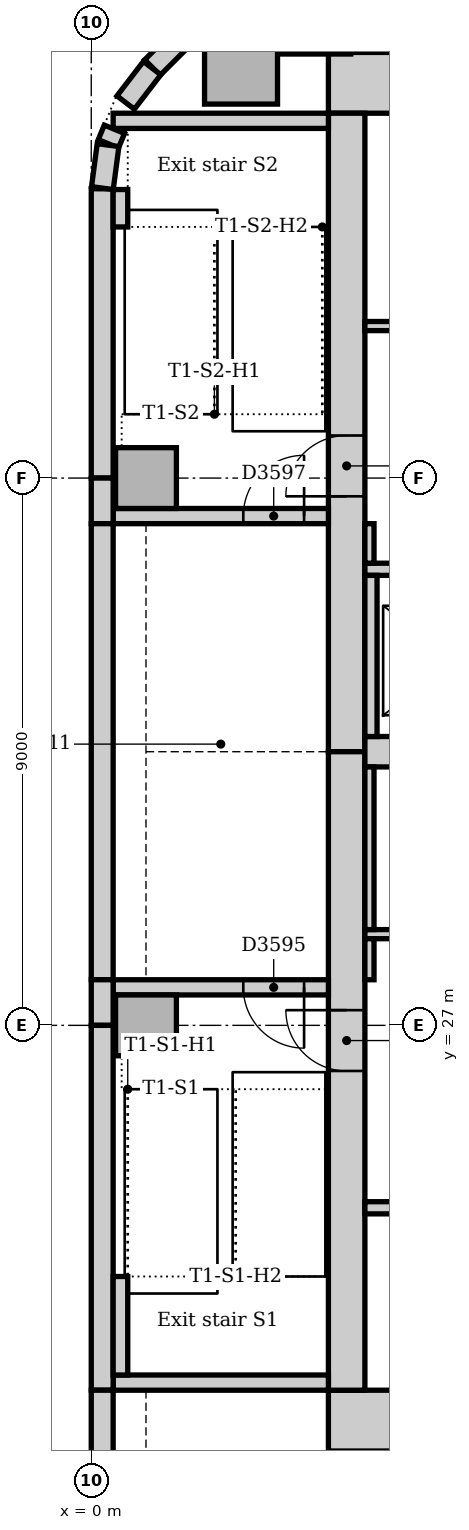
"""IFC4 building model, lengths in metres.
Left out: names, types, materials, properties, quantities, classifications, styles, units other than length and angle.
Written with IfcOpenShell. Run it as: python <this file> out.ifc"""

import sys

from ifc_helpers import new_model, si_unit, direction, frame, frame_2d, origin, origin_2d, place, context, subcontext, project, spatial, rectangle, extrude, element, fill, save


model = new_model("IFC4")
c1 = context("Model", 3, precision=1e-05, world=origin(), true_north=direction((0.0, 1.0)))
c2 = subcontext(c1, "Body", "Model", "MODEL_VIEW")
j1 = project(units=[si_unit("LENGTHUNIT", "METRE"), si_unit("PLANEANGLEUNIT", "RADIAN")], contexts=[c1])
p1 = place(None, origin())
s1 = spatial("IfcSite", under=j1, at=p1, CompositionType="ELEMENT")
p2 = place(p1, origin())
s2 = spatial("IfcBuilding", under=s1, at=p2, CompositionType="ELEMENT")
p3 = place(p2, frame((0.0, 0.0, 67.0)))
s3 = spatial("IfcBuildingStorey", under=s2, at=p3, CompositionType="ELEMENT", Elevation=67.0)
for number, where, z_axis, x_axis in (
    (1, (3.9, 20.5, 0.0), (0.0, 0.0, 1.0), (1.0, 0.0, 0.0)),
    (2, (23.5, 42.5, 0.0), (0.0, 0.0, 1.0), (-1.0, 0.0, 0.0)),
):
    element("IfcWall", number, at=place(p3, frame(where, z_axis=z_axis, x_axis=x_axis)), inside=s3, PredefinedType="SOLIDWALL", context=c2, shape_type="SweptSolid", body=[
        extrude(rectangle(XDim=19.6, YDim=1.0, at=frame_2d((9.8, 0.0))), origin(), (0.0, 0.0, 1.0), 4.0),
    ])
p4 = place(p3, frame((4.2, 42.0, 0.0), z_axis=(0.0, 0.0, 1.0), x_axis=(0.0, -1.0, 0.0)))
e3 = element("IfcWall", 3, at=p4, inside=s3, PredefinedType="SOLIDWALL", context=c2, shape_type="SweptSolid", body=[
    extrude(rectangle(XDim=10.5, YDim=0.6, at=frame_2d((5.25, 0.0))), origin(), (0.0, 0.0, 1.0), 4.0),
])
p5 = place(p4, frame((5.3, 0.0, 0.0)))
e4 = element("IfcOpeningElement", 4, at=p5, cuts=e3, PredefinedType="OPENING", context=c2, shape_type="SweptSolid", body=[
    extrude(rectangle(XDim=1.0, YDim=2.1, at=frame_2d((0.5, 1.05))), frame((0.0, 0.31, 0.0), z_axis=(0.0, -1.0, 0.0), x_axis=(1.0, 0.0, 0.0)), (0.0, 0.0, 1.0), 0.62),
])
p6 = place(p3, frame((4.2, 31.5, 0.0), z_axis=(0.0, 0.0, 1.0), x_axis=(0.0, -1.0, 0.0)))
e5 = element("IfcWall", 5, at=p6, inside=s3, PredefinedType="SOLIDWALL", context=c2, shape_type="SweptSolid", body=[
    extrude(rectangle(XDim=10.5, YDim=0.6, at=frame_2d((5.25, 0.0))), origin(), (0.0, 0.0, 1.0), 4.0),
])
p7 = place(p6, frame((4.25, 0.0, 0.0)))
e6 = element("IfcOpeningElement", 6, at=p7, cuts=e5, PredefinedType="OPENING", context=c2, shape_type="SweptSolid", body=[
    extrude(rectangle(XDim=1.0, YDim=2.1, at=frame_2d((0.5, 1.05))), frame((0.0, 0.31, 0.0), z_axis=(0.0, -1.0, 0.0), x_axis=(1.0, 0.0, 0.0)), (0.0, 0.0, 1.0), 0.62),
])
p8 = place(p3, frame((4.5, 31.5, 0.0), z_axis=(0.0, 0.0, 1.0), x_axis=(1.0, 0.0, 0.0)))
e7 = element("IfcWall", 7, at=p8, inside=s3, PredefinedType="SOLIDWALL", context=c2, shape_type="SweptSolid", body=[
    extrude(rectangle(XDim=18.0, YDim=0.5, at=frame_2d((9.0, 0.0))), origin(), (0.0, 0.0, 1.0), 4.0),
])
p9 = place(p3, frame((0.36, 21.125, 0.0), z_axis=(0.0, 0.0, 1.0), x_axis=(1.0, 0.0, 0.0)))
e8 = element("IfcWall", 8, at=p9, inside=s3, PredefinedType="SOLIDWALL", context=c2, shape_type="SweptSolid", body=[
    extrude(rectangle(XDim=3.54, YDim=0.25, at=frame_2d((1.77, 0.0))), origin(), (0.0, 0.0, 1.0), 4.0),
])
p10 = place(p3, frame((3.9, 27.625, 0.0), z_axis=(0.0, 0.0, 1.0), x_axis=(-1.0, 0.0, 0.0)))
e9 = element("IfcWall", 9, at=p10, inside=s3, PredefinedType="SOLIDWALL", context=c2, shape_type="SweptSolid", body=[
    extrude(rectangle(XDim=3.54, YDim=0.25, at=frame_2d((1.77, 0.0))), origin(), (0.0, 0.0, 1.0), 4.0),
])
p11 = place(p10, frame((0.4, 0.0, 0.0)))
e10 = element("IfcOpeningElement", 10, at=p11, cuts=e9, PredefinedType="OPENING", context=c2, shape_type="SweptSolid", body=[
    extrude(rectangle(XDim=1.0, YDim=2.1, at=frame_2d((0.5, 1.05))), frame((0.0, 0.135, 0.0), z_axis=(0.0, -1.0, 0.0), x_axis=(1.0, 0.0, 0.0)), (0.0, 0.0, 1.0), 0.27),
])
p12 = place(p3, frame((0.36, 35.375, 0.0), z_axis=(0.0, 0.0, 1.0), x_axis=(1.0, 0.0, 0.0)))
e11 = element("IfcWall", 11, at=p12, inside=s3, PredefinedType="SOLIDWALL", context=c2, shape_type="SweptSolid", body=[
    extrude(rectangle(XDim=3.54, YDim=0.25, at=frame_2d((1.77, 0.0))), origin(), (0.0, 0.0, 1.0), 4.0),
])
p13 = place(p12, frame((2.14, 0.0, 0.0)))
e12 = element("IfcOpeningElement", 12, at=p13, cuts=e11, PredefinedType="OPENING", context=c2, shape_type="SweptSolid", body=[
    extrude(rectangle(XDim=1.0, YDim=2.1, at=frame_2d((0.5, 1.05))), frame((0.0, 0.135, 0.0), z_axis=(0.0, -1.0, 0.0), x_axis=(1.0, 0.0, 0.0)), (0.0, 0.0, 1.0), 0.27),
])
p14 = place(p3, frame((3.9, 41.875, 0.0), z_axis=(0.0, 0.0, 1.0), x_axis=(-1.0, 0.0, 0.0)))
e13 = element("IfcWall", 13, at=p14, inside=s3, PredefinedType="SOLIDWALL", context=c2, shape_type="SweptSolid", body=[
    extrude(rectangle(XDim=3.54, YDim=0.25, at=frame_2d((1.77, 0.0))), origin(), (0.0, 0.0, 1.0), 4.0),
])
for number, where, z_axis, x_axis in (
    (14, (3.667, 43.574, 0.0), (0.0, 0.0, 1.0), (1.0, 0.0, 0.0)),
    (15, (2.463, 42.75, 0.0), (0.0, 0.0, 1.0), (1.0, 0.0, 0.0)),
):
    element("IfcColumn", number, at=place(p3, frame(where, z_axis=z_axis, x_axis=x_axis)), inside=s3, PredefinedType="COLUMN", context=c2, shape_type="SweptSolid", body=[
        extrude(rectangle(XDim=1.2, YDim=1.2, at=origin_2d()), origin(), (0.0, 0.0, 1.0), 3.85),
    ])
for number, where, z_axis, x_axis in (
    (16, (0.9, 27.0, 0.0), (0.0, 0.0, 1.0), (1.0, 0.0, 0.0)),
    (17, (0.9, 36.0, 0.0), (0.0, 0.0, 1.0), (1.0, 0.0, 0.0)),
):
    element("IfcColumn", number, at=place(p3, frame(where, z_axis=z_axis, x_axis=x_axis)), inside=s3, PredefinedType="COLUMN", context=c2, shape_type="SweptSolid", body=[
        extrude(rectangle(XDim=1.0, YDim=1.0, at=origin_2d()), origin(), (0.0, 0.0, 1.0), 4.0),
    ])
p15 = place(p3, frame((2.249, 43.994, 0.0), z_axis=(0.0, 0.0, 1.0), x_axis=(-0.707106781187, -0.707106781187, 0.0)))
e18 = element("IfcWall", 18, at=p15, inside=s3, PredefinedType="STANDARD", context=c2, shape_type="SweptSolid", body=[
    extrude(rectangle(XDim=1.757, YDim=0.36, at=frame_2d((0.879, 0.0))), origin(), (0.0, 0.0, 1.0), 3.85),
])
p16 = place(p3, frame((0.18, 40.757, 0.0), z_axis=(0.0, 0.0, 1.0), x_axis=(0.0, -1.0, 0.0)))
e19 = element("IfcWall", 19, at=p16, inside=s3, PredefinedType="STANDARD", context=c2, shape_type="SweptSolid", body=[
    extrude(rectangle(XDim=4.757, YDim=0.36, at=frame_2d((2.379, 0.0))), origin(), (0.0, 0.0, 1.0), 3.85),
])
p17 = place(p3, frame((0.18, 36.0, 0.0), z_axis=(0.0, 0.0, 1.0), x_axis=(0.0, -1.0, 0.0)))
e20 = element("IfcWall", 20, at=p17, inside=s3, PredefinedType="STANDARD", context=c2, shape_type="SweptSolid", body=[
    extrude(rectangle(XDim=0.75, YDim=0.36, at=frame_2d((0.375, 0.0))), origin(), (0.0, 0.0, 1.0), 3.436),
])
p18 = place(p3, frame((0.18, 35.25, 0.0), z_axis=(0.0, 0.0, 1.0), x_axis=(0.0, -1.0, 0.0)))
e21 = element("IfcWall", 21, at=p18, inside=s3, PredefinedType="STANDARD", context=c2, shape_type="SweptSolid", body=[
    extrude(rectangle(XDim=7.5, YDim=0.36, at=frame_2d((3.75, 0.0))), origin(), (0.0, 0.0, 1.0), 3.436),
])
p19 = place(p3, frame((0.18, 27.75, 0.0), z_axis=(0.0, 0.0, 1.0), x_axis=(0.0, -1.0, 0.0)))
e22 = element("IfcWall", 22, at=p19, inside=s3, PredefinedType="STANDARD", context=c2, shape_type="SweptSolid", body=[
    extrude(rectangle(XDim=0.75, YDim=0.36, at=frame_2d((0.375, 0.0))), origin(), (0.0, 0.0, 1.0), 3.436),
])
p20 = place(p3, frame((0.18, 27.0, 0.0), z_axis=(0.0, 0.0, 1.0), x_axis=(0.0, -1.0, 0.0)))
e23 = element("IfcWall", 23, at=p20, inside=s3, PredefinedType="STANDARD", context=c2, shape_type="SweptSolid", body=[
    extrude(rectangle(XDim=6.0, YDim=0.36, at=frame_2d((3.0, 0.0))), origin(), (0.0, 0.0, 1.0), 3.85),
])
p21 = place(p3, frame((0.18, 21.0, 0.0), z_axis=(0.0, 0.0, 1.0), x_axis=(0.0, -1.0, 0.0)))
e24 = element("IfcWall", 24, at=p21, inside=s3, PredefinedType="STANDARD", context=c2, shape_type="SweptSolid", body=[
    extrude(rectangle(XDim=16.757, YDim=0.36, at=frame_2d((8.379, 0.0))), origin(), (0.0, 0.0, 1.0), 3.85),
])
p22 = place(p21, frame((1.35, 0.0, 0.9)))
e25 = element("IfcOpeningElement", 25, at=p22, cuts=e24, PredefinedType="OPENING", context=c2, shape_type="SweptSolid", body=[
    extrude(rectangle(XDim=3.3, YDim=1.6, at=frame_2d((1.65, 0.8))), frame((0.0, 0.19, 0.0), z_axis=(0.0, -1.0, 0.0), x_axis=(1.0, 0.0, 0.0)), (0.0, 0.0, 1.0), 0.38),
])
p23 = place(p21, frame((5.85, 0.0, 0.9)))
e26 = element("IfcOpeningElement", 26, at=p23, cuts=e24, PredefinedType="OPENING", context=c2, shape_type="SweptSolid", body=[
    extrude(rectangle(XDim=3.3, YDim=1.6, at=frame_2d((1.65, 0.8))), frame((0.0, 0.19, 0.0), z_axis=(0.0, -1.0, 0.0), x_axis=(1.0, 0.0, 0.0)), (0.0, 0.0, 1.0), 0.38),
])
p24 = place(p21, frame((10.35, 0.0, 0.9)))
e27 = element("IfcOpeningElement", 27, at=p24, cuts=e24, PredefinedType="OPENING", context=c2, shape_type="SweptSolid", body=[
    extrude(rectangle(XDim=3.3, YDim=1.6, at=frame_2d((1.65, 0.8))), frame((0.0, 0.19, 0.0), z_axis=(0.0, -1.0, 0.0), x_axis=(1.0, 0.0, 0.0)), (0.0, 0.0, 1.0), 0.38),
])
p25 = place(p3, frame((1.0, 42.741, 0.0), z_axis=(0.0, 0.0, 1.0), x_axis=(-0.608802368033, -0.793321924995, 0.0)))
e28 = element("IfcWall", 28, at=p25, inside=s3, PredefinedType="STANDARD", context=c2, shape_type="SweptSolid", body=[
    extrude(rectangle(XDim=0.713, YDim=0.36, at=frame_2d((0.357, 0.0))), origin(), (0.0, 0.0, 1.0), 3.85),
])
p26 = place(p3, frame((0.381, 41.736, 0.0), z_axis=(0.0, 0.0, 1.0), x_axis=(-0.382773360986, -0.923842277729, 0.0)))
e29 = element("IfcWall", 29, at=p26, inside=s3, PredefinedType="STANDARD", context=c2, shape_type="SweptSolid", body=[
    extrude(rectangle(XDim=0.258, YDim=0.36, at=frame_2d((0.129, 0.0))), origin(), (0.0, 0.0, 1.0), 3.85),
])
p27 = place(p3, frame((0.276, 41.476, 0.0), z_axis=(0.0, 0.0, 1.0), x_axis=(-0.13055608231, -0.99144092581, 0.0)))
e30 = element("IfcWall", 30, at=p27, inside=s3, PredefinedType="STANDARD", context=c2, shape_type="SweptSolid", body=[
    extrude(rectangle(XDim=0.713, YDim=0.36, at=frame_2d((0.356, 0.0))), origin(), (0.0, 0.0, 1.0), 3.85),
])
p28 = place(p3, frame((0.48, 21.25, 0.0), z_axis=(0.0, 0.0, 1.0), x_axis=(0.0, 1.0, 0.0)))
e31 = element("IfcWall", 31, at=p28, inside=s3, PredefinedType="STANDARD", context=c2, shape_type="SweptSolid", body=[
    extrude(rectangle(XDim=1.62, YDim=0.24, at=frame_2d((0.81, 0.0))), origin(), (0.0, 0.0, 1.0), 4.0),
])
p29 = place(p3, frame((0.48, 40.13, 0.0), z_axis=(0.0, 0.0, 1.0), x_axis=(0.0, 1.0, 0.0)))
e32 = element("IfcWall", 32, at=p29, inside=s3, PredefinedType="STANDARD", context=c2, shape_type="SweptSolid", body=[
    extrude(rectangle(XDim=0.615, YDim=0.24, at=frame_2d((0.307, 0.0))), origin(), (0.0, 0.0, 1.0), 4.0),
])
p30 = place(p3, frame((4.5, 24.0, 0.0), z_axis=(0.0, 0.0, 1.0), x_axis=(1.0, 0.0, 0.0)))
e33 = element("IfcWall", 33, at=p30, inside=s3, PredefinedType="PARTITIONING", context=c2, shape_type="SweptSolid", body=[
    extrude(rectangle(XDim=18.0, YDim=0.2, at=frame_2d((9.0, 0.0))), origin(), (0.0, 0.0, 1.0), 3.85),
])
p31 = place(p30, frame((0.95, 0.0, 0.0)))
e34 = element("IfcOpeningElement", 34, at=p31, cuts=e33, PredefinedType="OPENING", context=c2, shape_type="SweptSolid", body=[
    extrude(rectangle(XDim=1.1, YDim=2.1, at=frame_2d((0.55, 1.05))), frame((0.0, 0.11, 0.0), z_axis=(0.0, -1.0, 0.0), x_axis=(1.0, 0.0, 0.0)), (0.0, 0.0, 1.0), 0.22),
])
p32 = place(p30, frame((3.95, 0.0, 0.0)))
e35 = element("IfcOpeningElement", 35, at=p32, cuts=e33, PredefinedType="OPENING", context=c2, shape_type="SweptSolid", body=[
    extrude(rectangle(XDim=1.1, YDim=2.1, at=frame_2d((0.55, 1.05))), frame((0.0, 0.11, 0.0), z_axis=(0.0, -1.0, 0.0), x_axis=(1.0, 0.0, 0.0)), (0.0, 0.0, 1.0), 0.22),
])
p33 = place(p30, frame((6.95, 0.0, 0.0)))
e36 = element("IfcOpeningElement", 36, at=p33, cuts=e33, PredefinedType="OPENING", context=c2, shape_type="SweptSolid", body=[
    extrude(rectangle(XDim=1.1, YDim=2.1, at=frame_2d((0.55, 1.05))), frame((0.0, 0.11, 0.0), z_axis=(0.0, -1.0, 0.0), x_axis=(1.0, 0.0, 0.0)), (0.0, 0.0, 1.0), 0.22),
])
p34 = place(p30, frame((9.95, 0.0, 0.0)))
e37 = element("IfcOpeningElement", 37, at=p34, cuts=e33, PredefinedType="OPENING", context=c2, shape_type="SweptSolid", body=[
    extrude(rectangle(XDim=1.1, YDim=2.1, at=frame_2d((0.55, 1.05))), frame((0.0, 0.11, 0.0), z_axis=(0.0, -1.0, 0.0), x_axis=(1.0, 0.0, 0.0)), (0.0, 0.0, 1.0), 0.22),
])
p35 = place(p30, frame((12.95, 0.0, 0.0)))
e38 = element("IfcOpeningElement", 38, at=p35, cuts=e33, PredefinedType="OPENING", context=c2, shape_type="SweptSolid", body=[
    extrude(rectangle(XDim=1.1, YDim=2.1, at=frame_2d((0.55, 1.05))), frame((0.0, 0.11, 0.0), z_axis=(0.0, -1.0, 0.0), x_axis=(1.0, 0.0, 0.0)), (0.0, 0.0, 1.0), 0.22),
])
p36 = place(p30, frame((15.95, 0.0, 0.0)))
e39 = element("IfcOpeningElement", 39, at=p36, cuts=e33, PredefinedType="OPENING", context=c2, shape_type="SweptSolid", body=[
    extrude(rectangle(XDim=1.1, YDim=2.1, at=frame_2d((0.55, 1.05))), frame((0.0, 0.11, 0.0), z_axis=(0.0, -1.0, 0.0), x_axis=(1.0, 0.0, 0.0)), (0.0, 0.0, 1.0), 0.22),
])
p37 = place(p3, frame((4.5, 34.5, 0.0), z_axis=(0.0, 0.0, 1.0), x_axis=(1.0, 0.0, 0.0)))
e40 = element("IfcWall", 40, at=p37, inside=s3, PredefinedType="PARTITIONING", context=c2, shape_type="SweptSolid", body=[
    extrude(rectangle(XDim=18.0, YDim=0.2, at=frame_2d((9.0, 0.0))), origin(), (0.0, 0.0, 1.0), 3.85),
])
p38 = place(p37, frame((0.95, 0.0, 0.0)))
e41 = element("IfcOpeningElement", 41, at=p38, cuts=e40, PredefinedType="OPENING", context=c2, shape_type="SweptSolid", body=[
    extrude(rectangle(XDim=1.1, YDim=2.1, at=frame_2d((0.55, 1.05))), frame((0.0, 0.11, 0.0), z_axis=(0.0, -1.0, 0.0), x_axis=(1.0, 0.0, 0.0)), (0.0, 0.0, 1.0), 0.22),
])
p39 = place(p37, frame((3.95, 0.0, 0.0)))
e42 = element("IfcOpeningElement", 42, at=p39, cuts=e40, PredefinedType="OPENING", context=c2, shape_type="SweptSolid", body=[
    extrude(rectangle(XDim=1.1, YDim=2.1, at=frame_2d((0.55, 1.05))), frame((0.0, 0.11, 0.0), z_axis=(0.0, -1.0, 0.0), x_axis=(1.0, 0.0, 0.0)), (0.0, 0.0, 1.0), 0.22),
])
p40 = place(p37, frame((12.95, 0.0, 0.0)))
e43 = element("IfcOpeningElement", 43, at=p40, cuts=e40, PredefinedType="OPENING", context=c2, shape_type="SweptSolid", body=[
    extrude(rectangle(XDim=1.1, YDim=2.1, at=frame_2d((0.55, 1.05))), frame((0.0, 0.11, 0.0), z_axis=(0.0, -1.0, 0.0), x_axis=(1.0, 0.0, 0.0)), (0.0, 0.0, 1.0), 0.22),
])
p41 = place(p37, frame((15.95, 0.0, 0.0)))
e44 = element("IfcOpeningElement", 44, at=p41, cuts=e40, PredefinedType="OPENING", context=c2, shape_type="SweptSolid", body=[
    extrude(rectangle(XDim=1.1, YDim=2.1, at=frame_2d((0.55, 1.05))), frame((0.0, 0.11, 0.0), z_axis=(0.0, -1.0, 0.0), x_axis=(1.0, 0.0, 0.0)), (0.0, 0.0, 1.0), 0.22),
])
p42 = place(p3, frame((4.6, 31.75, 0.0), z_axis=(0.0, 0.0, 1.0), x_axis=(0.0, 1.0, 0.0)))
e45 = element("IfcWall", 45, at=p42, inside=s3, PredefinedType="PARTITIONING", context=c2, shape_type="SweptSolid", body=[
    extrude(rectangle(XDim=2.65, YDim=0.2, at=frame_2d((1.325, 0.0))), origin(), (0.0, 0.0, 1.0), 3.85),
])
p43 = place(p3, frame((4.5, 28.5, 0.0), z_axis=(0.0, 0.0, 1.0), x_axis=(1.0, 0.0, 0.0)))
e46 = element("IfcWall", 46, at=p43, inside=s3, PredefinedType="PARTITIONING", context=c2, shape_type="SweptSolid", body=[
    extrude(rectangle(XDim=18.0, YDim=0.15, at=frame_2d((9.0, 0.0))), origin(), (0.0, 0.0, 1.0), 3.85),
])
p44 = place(p43, frame((1.85, 0.0, 0.0)))
e47 = element("IfcOpeningElement", 47, at=p44, cuts=e46, PredefinedType="OPENING", context=c2, shape_type="SweptSolid", body=[
    extrude(rectangle(XDim=0.9, YDim=2.1, at=frame_2d((0.45, 1.05))), frame((0.0, 0.085, 0.0), z_axis=(0.0, -1.0, 0.0), x_axis=(1.0, 0.0, 0.0)), (0.0, 0.0, 1.0), 0.17),
])
p45 = place(p43, frame((8.55, 0.0, 0.0)))
e48 = element("IfcOpeningElement", 48, at=p45, cuts=e46, PredefinedType="OPENING", context=c2, shape_type="SweptSolid", body=[
    extrude(rectangle(XDim=0.9, YDim=2.1, at=frame_2d((0.45, 1.05))), frame((0.0, 0.085, 0.0), z_axis=(0.0, -1.0, 0.0), x_axis=(1.0, 0.0, 0.0)), (0.0, 0.0, 1.0), 0.17),
])
p46 = place(p43, frame((15.2, 0.0, 0.0)))
e49 = element("IfcOpeningElement", 49, at=p46, cuts=e46, PredefinedType="OPENING", context=c2, shape_type="SweptSolid", body=[
    extrude(rectangle(XDim=0.9, YDim=2.1, at=frame_2d((0.45, 1.05))), frame((0.0, 0.085, 0.0), z_axis=(0.0, -1.0, 0.0), x_axis=(1.0, 0.0, 0.0)), (0.0, 0.0, 1.0), 0.17),
])
p47 = place(p3, frame((4.5, 38.5, 0.0), z_axis=(0.0, 0.0, 1.0), x_axis=(1.0, 0.0, 0.0)))
e50 = element("IfcWall", 50, at=p47, inside=s3, PredefinedType="PARTITIONING", context=c2, shape_type="SweptSolid", body=[
    extrude(rectangle(XDim=11.9, YDim=0.15, at=frame_2d((5.95, 0.0))), origin(), (0.0, 0.0, 1.0), 3.85),
])
p48 = place(p47, frame((1.1, 0.0, 0.0)))
e51 = element("IfcOpeningElement", 51, at=p48, cuts=e50, PredefinedType="OPENING", context=c2, shape_type="SweptSolid", body=[
    extrude(rectangle(XDim=0.9, YDim=2.1, at=frame_2d((0.45, 1.05))), frame((0.0, 0.085, 0.0), z_axis=(0.0, -1.0, 0.0), x_axis=(1.0, 0.0, 0.0)), (0.0, 0.0, 1.0), 0.17),
])
p49 = place(p47, frame((4.05, 0.0, 0.0)))
e52 = element("IfcOpeningElement", 52, at=p49, cuts=e50, PredefinedType="OPENING", context=c2, shape_type="SweptSolid", body=[
    extrude(rectangle(XDim=0.9, YDim=2.1, at=frame_2d((0.45, 1.05))), frame((0.0, 0.085, 0.0), z_axis=(0.0, -1.0, 0.0), x_axis=(1.0, 0.0, 0.0)), (0.0, 0.0, 1.0), 0.17),
])
p50 = place(p47, frame((7.05, 0.0, 0.0)))
e53 = element("IfcOpeningElement", 53, at=p50, cuts=e50, PredefinedType="OPENING", context=c2, shape_type="SweptSolid", body=[
    extrude(rectangle(XDim=0.9, YDim=2.1, at=frame_2d((0.45, 1.05))), frame((0.0, 0.085, 0.0), z_axis=(0.0, -1.0, 0.0), x_axis=(1.0, 0.0, 0.0)), (0.0, 0.0, 1.0), 0.17),
])
p51 = place(p47, frame((9.95, 0.0, 0.0)))
e54 = element("IfcOpeningElement", 54, at=p51, cuts=e50, PredefinedType="OPENING", context=c2, shape_type="SweptSolid", body=[
    extrude(rectangle(XDim=0.8, YDim=2.1, at=frame_2d((0.4, 1.05))), frame((0.0, 0.085, 0.0), z_axis=(0.0, -1.0, 0.0), x_axis=(1.0, 0.0, 0.0)), (0.0, 0.0, 1.0), 0.17),
])
p52 = place(p3, frame((4.575, 27.75, 0.0), z_axis=(0.0, 0.0, 1.0), x_axis=(0.0, 1.0, 0.0)))
e55 = element("IfcWall", 55, at=p52, inside=s3, PredefinedType="PARTITIONING", context=c2, shape_type="SweptSolid", body=[
    extrude(rectangle(XDim=0.675, YDim=0.15, at=frame_2d((0.338, 0.0))), origin(), (0.0, 0.0, 1.0), 3.85),
])
p53 = place(p3, frame((4.575, 28.575, 0.0), z_axis=(0.0, 0.0, 1.0), x_axis=(0.0, 1.0, 0.0)))
e56 = element("IfcWall", 56, at=p53, inside=s3, PredefinedType="PARTITIONING", context=c2, shape_type="SweptSolid", body=[
    extrude(rectangle(XDim=2.675, YDim=0.15, at=frame_2d((1.337, 0.0))), origin(), (0.0, 0.0, 1.0), 3.85),
])
p54 = place(p3, frame((4.575, 34.6, 0.0), z_axis=(0.0, 0.0, 1.0), x_axis=(0.0, 1.0, 0.0)))
e57 = element("IfcWall", 57, at=p54, inside=s3, PredefinedType="PARTITIONING", context=c2, shape_type="SweptSolid", body=[
    extrude(rectangle(XDim=0.65, YDim=0.15, at=frame_2d((0.325, 0.0))), origin(), (0.0, 0.0, 1.0), 3.85),
])
p55 = place(p7, frame((1.0, 0.0, 0.0), z_axis=(0.0, 0.0, 1.0), x_axis=(-1.0, 0.0, 0.0)))
e58 = element("IfcDoor", 58, at=p55, inside=s3, OperationType="SINGLE_SWING_RIGHT", PredefinedType="DOOR", context=c2, shape_type="SweptSolid", body=[
    extrude(rectangle(XDim=1.0, YDim=2.1, at=frame_2d((0.5, 1.05))), frame((0.0, 0.025, 0.0), z_axis=(0.0, -1.0, 0.0), x_axis=(1.0, 0.0, 0.0)), (0.0, 0.0, 1.0), 0.05),
])
fill(e6, e58)
p56 = place(p11, origin())
e59 = element("IfcDoor", 59, at=p56, inside=s3, OperationType="SINGLE_SWING_LEFT", PredefinedType="DOOR", context=c2, shape_type="SweptSolid", body=[
    extrude(rectangle(XDim=1.0, YDim=2.1, at=frame_2d((0.5, 1.05))), frame((0.0, 0.025, 0.0), z_axis=(0.0, -1.0, 0.0), x_axis=(1.0, 0.0, 0.0)), (0.0, 0.0, 1.0), 0.05),
])
fill(e10, e59)
p57 = place(p5, frame((1.0, 0.0, 0.0), z_axis=(0.0, 0.0, 1.0), x_axis=(-1.0, 0.0, 0.0)))
e60 = element("IfcDoor", 60, at=p57, inside=s3, OperationType="SINGLE_SWING_LEFT", PredefinedType="DOOR", context=c2, shape_type="SweptSolid", body=[
    extrude(rectangle(XDim=1.0, YDim=2.1, at=frame_2d((0.5, 1.05))), frame((0.0, 0.025, 0.0), z_axis=(0.0, -1.0, 0.0), x_axis=(1.0, 0.0, 0.0)), (0.0, 0.0, 1.0), 0.05),
])
fill(e4, e60)
p58 = place(p13, origin())
e61 = element("IfcDoor", 61, at=p58, inside=s3, OperationType="SINGLE_SWING_RIGHT", PredefinedType="DOOR", context=c2, shape_type="SweptSolid", body=[
    extrude(rectangle(XDim=1.0, YDim=2.1, at=frame_2d((0.5, 1.05))), frame((0.0, 0.025, 0.0), z_axis=(0.0, -1.0, 0.0), x_axis=(1.0, 0.0, 0.0)), (0.0, 0.0, 1.0), 0.05),
])
fill(e12, e61)
save(model, sys.argv[1])
